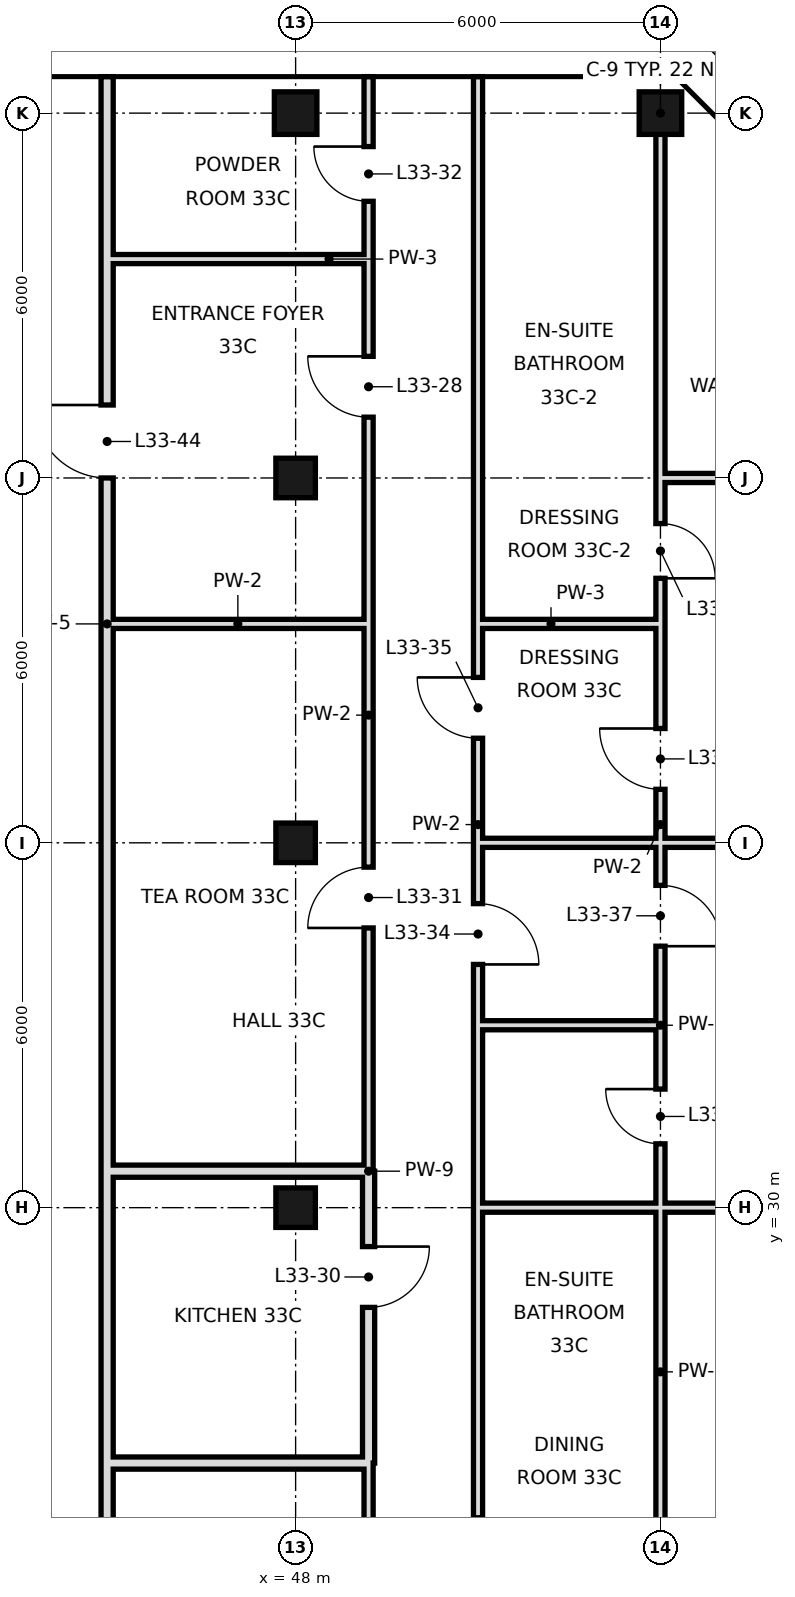
"""IFC4 building model, lengths in metres.
Left out: names, types, materials, properties, quantities, classifications, styles, units other than length and angle.
Written with IfcOpenShell. Run it as: python <this file> out.ifc"""

import sys

from ifc_helpers import new_model, si_unit, direction, frame, frame_2d, origin, origin_2d, place, context, subcontext, project, spatial, rectangle, hollow_rectangle, extrude, element, fill, save


model = new_model("IFC4")
c1 = context("Model", 3, precision=1e-05, world=origin(), true_north=direction((0.0, 1.0)))
c2 = subcontext(c1, "Body", "Model", "MODEL_VIEW")
j1 = project(units=[si_unit("LENGTHUNIT", "METRE"), si_unit("PLANEANGLEUNIT", "RADIAN")], contexts=[c1])
p1 = place(None, origin())
s1 = spatial("IfcSite", under=j1, at=p1, CompositionType="ELEMENT")
p2 = place(p1, origin())
s2 = spatial("IfcBuilding", under=s1, at=p2, CompositionType="ELEMENT")
p3 = place(p2, frame((0.0, 0.0, 147.4)))
s3 = spatial("IfcBuildingStorey", under=s2, at=p3, CompositionType="ELEMENT", Elevation=147.4)
for number, where, z_axis, x_axis in (
    (1, (48.0, 30.0, 0.0), (0.0, 0.0, 1.0), (1.0, 0.0, 0.0)),
    (2, (48.0, 36.0, 0.0), (0.0, 0.0, 1.0), (1.0, 0.0, 0.0)),
    (3, (48.0, 42.0, 0.0), (0.0, 0.0, 1.0), (1.0, 0.0, 0.0)),
):
    element("IfcColumn", number, at=place(p3, frame(where, z_axis=z_axis, x_axis=x_axis)), inside=s3, PredefinedType="COLUMN", context=c2, shape_type="SweptSolid", body=[
        extrude(hollow_rectangle(XDim=0.65, YDim=0.65, WallThickness=0.032, at=origin_2d()), origin(), (0.0, 0.0, 1.0), 3.6),
    ])
for number, where, z_axis, x_axis in (
    (4, (48.0, 48.0, 0.0), (0.0, 0.0, 1.0), (1.0, 0.0, 0.0)),
    (5, (54.0, 48.0, 0.0), (0.0, 0.0, 1.0), (1.0, 0.0, 0.0)),
):
    element("IfcColumn", number, at=place(p3, frame(where, z_axis=z_axis, x_axis=x_axis)), inside=s3, PredefinedType="COLUMN", context=c2, shape_type="SweptSolid", body=[
        extrude(hollow_rectangle(XDim=0.7, YDim=0.7, WallThickness=0.036, at=origin_2d()), origin(), (0.0, 0.0, 1.0), 3.6),
    ])
p4 = place(p3, frame((44.9, 18.7, 0.0), z_axis=(0.0, 0.0, 1.0), x_axis=(0.0, 1.0, 0.0)))
e6 = element("IfcWall", 6, at=p4, inside=s3, PredefinedType="SOLIDWALL", context=c2, shape_type="SweptSolid", body=[
    extrude(rectangle(XDim=7.1, YDim=0.2, at=frame_2d((3.55, 0.0))), origin(), (0.0, 0.0, 1.0), 3.42),
])
p5 = place(p3, frame((44.9, 30.6, 0.0), z_axis=(0.0, 0.0, 1.0), x_axis=(0.0, 1.0, 0.0)))
e7 = element("IfcWall", 7, at=p5, inside=s3, PredefinedType="SOLIDWALL", context=c2, shape_type="SweptSolid", body=[
    extrude(rectangle(XDim=18.0, YDim=0.2, at=frame_2d((9.0, 0.0))), origin(), (0.0, 0.0, 1.0), 2.72),
])
p6 = place(p5, frame((11.4, 0.0, 0.0)))
e8 = element("IfcOpeningElement", 8, at=p6, cuts=e7, PredefinedType="OPENING", context=c2, shape_type="SweptSolid", body=[
    extrude(rectangle(XDim=1.2, YDim=2.4, at=frame_2d((0.6, 1.2))), frame((0.0, 0.11, 0.0), z_axis=(0.0, -1.0, 0.0), x_axis=(1.0, 0.0, 0.0)), (0.0, 0.0, 1.0), 0.22),
])
p7 = place(p3, frame((44.9, 25.8, 0.0), z_axis=(0.0, 0.0, 1.0), x_axis=(0.0, 1.0, 0.0)))
e9 = element("IfcWall", 9, at=p7, inside=s3, PredefinedType="SOLIDWALL", context=c2, shape_type="SweptSolid", body=[
    extrude(rectangle(XDim=4.8, YDim=0.2, at=frame_2d((2.4, 0.0))), origin(), (0.0, 0.0, 1.0), 2.97),
])
p8 = place(p3, frame((49.2, 25.8, 0.0), z_axis=(0.0, 0.0, 1.0), x_axis=(0.0, 1.0, 0.0)))
e10 = element("IfcWall", 10, at=p8, inside=s3, PredefinedType="SOLIDWALL", context=c2, shape_type="SweptSolid", body=[
    extrude(rectangle(XDim=4.8, YDim=0.2, at=frame_2d((2.4, 0.0))), origin(), (0.0, 0.0, 1.0), 2.72),
])
p9 = place(p8, frame((2.56, 0.0, 0.0)))
e11 = element("IfcOpeningElement", 11, at=p9, cuts=e10, PredefinedType="OPENING", context=c2, shape_type="SweptSolid", body=[
    extrude(rectangle(XDim=1.0, YDim=2.4, at=frame_2d((0.5, 1.2))), frame((0.0, 0.11, 0.0), z_axis=(0.0, -1.0, 0.0), x_axis=(1.0, 0.0, 0.0)), (0.0, 0.0, 1.0), 0.22),
])
p10 = place(p3, frame((49.2, 18.0, 0.0), z_axis=(0.0, 0.0, 1.0), x_axis=(0.0, 1.0, 0.0)))
e12 = element("IfcWall", 12, at=p10, inside=s3, PredefinedType="PARTITIONING", context=c2, shape_type="SweptSolid", body=[
    extrude(rectangle(XDim=7.8, YDim=0.15, at=frame_2d((3.9, 0.0))), origin(), (0.0, 0.0, 1.0), 3.42),
])
p11 = place(p10, frame((2.14, 0.0, 0.0)))
e13 = element("IfcOpeningElement", 13, at=p11, cuts=e12, PredefinedType="OPENING", context=c2, shape_type="SweptSolid", body=[
    extrude(rectangle(XDim=1.0, YDim=2.4, at=frame_2d((0.5, 1.2))), frame((0.0, 0.085, 0.0), z_axis=(0.0, -1.0, 0.0), x_axis=(1.0, 0.0, 0.0)), (0.0, 0.0, 1.0), 0.17),
])
p12 = place(p3, frame((49.2, 30.6, 0.0), z_axis=(0.0, 0.0, 1.0), x_axis=(0.0, 1.0, 0.0)))
e14 = element("IfcWall", 14, at=p12, inside=s3, PredefinedType="PARTITIONING", context=c2, shape_type="SweptSolid", body=[
    extrude(rectangle(XDim=15.0, YDim=0.15, at=frame_2d((7.5, 0.0))), origin(), (0.0, 0.0, 1.0), 3.42),
])
p13 = place(p12, frame((12.4, 0.0, 0.0)))
e15 = element("IfcOpeningElement", 15, at=p13, cuts=e14, PredefinedType="OPENING", context=c2, shape_type="SweptSolid", body=[
    extrude(rectangle(XDim=1.0, YDim=2.4, at=frame_2d((0.5, 1.2))), frame((0.0, 0.085, 0.0), z_axis=(0.0, -1.0, 0.0), x_axis=(1.0, 0.0, 0.0)), (0.0, 0.0, 1.0), 0.17),
])
p14 = place(p12, frame((4.0, 0.0, 0.0)))
e16 = element("IfcOpeningElement", 16, at=p14, cuts=e14, PredefinedType="OPENING", context=c2, shape_type="SweptSolid", body=[
    extrude(rectangle(XDim=1.0, YDim=2.4, at=frame_2d((0.5, 1.2))), frame((0.0, 0.085, 0.0), z_axis=(0.0, -1.0, 0.0), x_axis=(1.0, 0.0, 0.0)), (0.0, 0.0, 1.0), 0.17),
])
p15 = place(p3, frame((49.2, 45.6, 0.0), z_axis=(0.0, 0.0, 1.0), x_axis=(0.0, 1.0, 0.0)))
e17 = element("IfcWall", 17, at=p15, inside=s3, PredefinedType="PARTITIONING", context=c2, shape_type="SweptSolid", body=[
    extrude(rectangle(XDim=3.0, YDim=0.15, at=frame_2d((1.5, 0.0))), origin(), (0.0, 0.0, 1.0), 3.42),
])
p16 = place(p15, frame((0.95, 0.0, 0.0)))
e18 = element("IfcOpeningElement", 18, at=p16, cuts=e17, PredefinedType="OPENING", context=c2, shape_type="SweptSolid", body=[
    extrude(rectangle(XDim=0.9, YDim=2.4, at=frame_2d((0.45, 1.2))), frame((0.0, 0.085, 0.0), z_axis=(0.0, -1.0, 0.0), x_axis=(1.0, 0.0, 0.0)), (0.0, 0.0, 1.0), 0.17),
])
p17 = place(p3, frame((51.0, 18.0, 0.0), z_axis=(0.0, 0.0, 1.0), x_axis=(0.0, 1.0, 0.0)))
e19 = element("IfcWall", 19, at=p17, inside=s3, PredefinedType="PARTITIONING", context=c2, shape_type="SweptSolid", body=[
    extrude(rectangle(XDim=12.0, YDim=0.15, at=frame_2d((6.0, 0.0))), origin(), (0.0, 0.0, 1.0), 3.42),
])
p18 = place(p17, frame((5.1, 0.0, 0.0)))
e20 = element("IfcOpeningElement", 20, at=p18, cuts=e19, PredefinedType="OPENING", context=c2, shape_type="SweptSolid", body=[
    extrude(rectangle(XDim=1.8, YDim=2.4, at=frame_2d((0.9, 1.2))), frame((0.0, 0.085, 0.0), z_axis=(0.0, -1.0, 0.0), x_axis=(1.0, 0.0, 0.0)), (0.0, 0.0, 1.0), 0.17),
])
p19 = place(p3, frame((51.0, 33.0, 0.0), z_axis=(0.0, 0.0, 1.0), x_axis=(0.0, 1.0, 0.0)))
e21 = element("IfcWall", 21, at=p19, inside=s3, PredefinedType="PARTITIONING", context=c2, shape_type="SweptSolid", body=[
    extrude(rectangle(XDim=6.6, YDim=0.15, at=frame_2d((3.3, 0.0))), origin(), (0.0, 0.0, 1.0), 3.42),
])
p20 = place(p19, frame((1.0, 0.0, 0.0)))
e22 = element("IfcOpeningElement", 22, at=p20, cuts=e21, PredefinedType="OPENING", context=c2, shape_type="SweptSolid", body=[
    extrude(rectangle(XDim=1.0, YDim=2.4, at=frame_2d((0.5, 1.2))), frame((0.0, 0.085, 0.0), z_axis=(0.0, -1.0, 0.0), x_axis=(1.0, 0.0, 0.0)), (0.0, 0.0, 1.0), 0.17),
])
p21 = place(p19, frame((4.72, 0.0, 0.0)))
e23 = element("IfcOpeningElement", 23, at=p21, cuts=e21, PredefinedType="OPENING", context=c2, shape_type="SweptSolid", body=[
    extrude(rectangle(XDim=1.0, YDim=2.4, at=frame_2d((0.5, 1.2))), frame((0.0, 0.085, 0.0), z_axis=(0.0, -1.0, 0.0), x_axis=(1.0, 0.0, 0.0)), (0.0, 0.0, 1.0), 0.17),
])
p22 = place(p3, frame((51.0, 30.0, 0.0), z_axis=(0.0, 0.0, 1.0), x_axis=(0.0, 1.0, 0.0)))
e24 = element("IfcWall", 24, at=p22, inside=s3, PredefinedType="PARTITIONING", context=c2, shape_type="SweptSolid", body=[
    extrude(rectangle(XDim=3.0, YDim=0.15, at=frame_2d((1.5, 0.0))), origin(), (0.0, 0.0, 1.0), 3.42),
])
p23 = place(p3, frame((51.0, 39.6, 0.0), z_axis=(0.0, 0.0, 1.0), x_axis=(0.0, 1.0, 0.0)))
e25 = element("IfcWall", 25, at=p23, inside=s3, PredefinedType="PARTITIONING", context=c2, shape_type="SweptSolid", body=[
    extrude(rectangle(XDim=9.0, YDim=0.15, at=frame_2d((4.5, 0.0))), origin(), (0.0, 0.0, 1.0), 3.42),
])
p24 = place(p3, frame((54.0, 18.0, 0.0), z_axis=(0.0, 0.0, 1.0), x_axis=(0.0, 1.0, 0.0)))
e26 = element("IfcWall", 26, at=p24, inside=s3, PredefinedType="PARTITIONING", context=c2, shape_type="SweptSolid", body=[
    extrude(rectangle(XDim=12.0, YDim=0.15, at=frame_2d((6.0, 0.0))), origin(), (0.0, 0.0, 1.0), 3.42),
])
p25 = place(p24, frame((3.16, 0.0, 0.0)))
e27 = element("IfcOpeningElement", 27, at=p25, cuts=e26, PredefinedType="OPENING", context=c2, shape_type="SweptSolid", body=[
    extrude(rectangle(XDim=1.8, YDim=2.4, at=frame_2d((0.9, 1.2))), frame((0.0, 0.085, 0.0), z_axis=(0.0, -1.0, 0.0), x_axis=(1.0, 0.0, 0.0)), (0.0, 0.0, 1.0), 0.17),
])
p26 = place(p3, frame((54.0, 33.0, 0.0), z_axis=(0.0, 0.0, 1.0), x_axis=(0.0, 1.0, 0.0)))
e28 = element("IfcWall", 28, at=p26, inside=s3, PredefinedType="PARTITIONING", context=c2, shape_type="SweptSolid", body=[
    extrude(rectangle(XDim=6.6, YDim=0.15, at=frame_2d((3.3, 0.0))), origin(), (0.0, 0.0, 1.0), 3.42),
])
p27 = place(p26, frame((1.3, 0.0, 0.0)))
e29 = element("IfcOpeningElement", 29, at=p27, cuts=e28, PredefinedType="OPENING", context=c2, shape_type="SweptSolid", body=[
    extrude(rectangle(XDim=1.0, YDim=2.4, at=frame_2d((0.5, 1.2))), frame((0.0, 0.085, 0.0), z_axis=(0.0, -1.0, 0.0), x_axis=(1.0, 0.0, 0.0)), (0.0, 0.0, 1.0), 0.17),
])
p28 = place(p26, frame((3.88, 0.0, 0.0)))
e30 = element("IfcOpeningElement", 30, at=p28, cuts=e28, PredefinedType="OPENING", context=c2, shape_type="SweptSolid", body=[
    extrude(rectangle(XDim=1.0, YDim=2.4, at=frame_2d((0.5, 1.2))), frame((0.0, 0.085, 0.0), z_axis=(0.0, -1.0, 0.0), x_axis=(1.0, 0.0, 0.0)), (0.0, 0.0, 1.0), 0.17),
])
p29 = place(p3, frame((54.0, 30.0, 0.0), z_axis=(0.0, 0.0, 1.0), x_axis=(0.0, 1.0, 0.0)))
e31 = element("IfcWall", 31, at=p29, inside=s3, PredefinedType="PARTITIONING", context=c2, shape_type="SweptSolid", body=[
    extrude(rectangle(XDim=3.0, YDim=0.15, at=frame_2d((1.5, 0.0))), origin(), (0.0, 0.0, 1.0), 3.42),
])
p30 = place(p29, frame((1.05, 0.0, 0.0)))
e32 = element("IfcOpeningElement", 32, at=p30, cuts=e31, PredefinedType="OPENING", context=c2, shape_type="SweptSolid", body=[
    extrude(rectangle(XDim=0.9, YDim=2.4, at=frame_2d((0.45, 1.2))), frame((0.0, 0.085, 0.0), z_axis=(0.0, -1.0, 0.0), x_axis=(1.0, 0.0, 0.0)), (0.0, 0.0, 1.0), 0.17),
])
p31 = place(p3, frame((54.0, 39.6, 0.0), z_axis=(0.0, 0.0, 1.0), x_axis=(0.0, 1.0, 0.0)))
e33 = element("IfcWall", 33, at=p31, inside=s3, PredefinedType="PARTITIONING", context=c2, shape_type="SweptSolid", body=[
    extrude(rectangle(XDim=8.4, YDim=0.15, at=frame_2d((4.2, 0.0))), origin(), (0.0, 0.0, 1.0), 3.42),
])
p32 = place(p31, frame((0.75, 0.0, 0.0)))
e34 = element("IfcOpeningElement", 34, at=p32, cuts=e33, PredefinedType="OPENING", context=c2, shape_type="SweptSolid", body=[
    extrude(rectangle(XDim=0.9, YDim=2.4, at=frame_2d((0.45, 1.2))), frame((0.0, 0.085, 0.0), z_axis=(0.0, -1.0, 0.0), x_axis=(1.0, 0.0, 0.0)), (0.0, 0.0, 1.0), 0.17),
])
p33 = place(p3, frame((44.9, 25.8, 0.0), z_axis=(0.0, 0.0, 1.0), x_axis=(1.0, 0.0, 0.0)))
e35 = element("IfcWall", 35, at=p33, inside=s3, PredefinedType="SOLIDWALL", context=c2, shape_type="SweptSolid", body=[
    extrude(rectangle(XDim=4.3, YDim=0.2, at=frame_2d((2.15, 0.0))), origin(), (0.0, 0.0, 1.0), 2.97),
])
p34 = place(p3, frame((54.0, 30.0, 0.0), z_axis=(0.0, 0.0, 1.0), x_axis=(1.0, 0.0, 0.0)))
e36 = element("IfcWall", 36, at=p34, inside=s3, PredefinedType="PARTITIONING", context=c2, shape_type="SweptSolid", body=[
    extrude(rectangle(XDim=6.6, YDim=0.15, at=frame_2d((3.3, 0.0))), origin(), (0.0, 0.0, 1.0), 2.72),
])
p35 = place(p3, frame((51.0, 30.0, 0.0), z_axis=(0.0, 0.0, 1.0), x_axis=(1.0, 0.0, 0.0)))
e37 = element("IfcWall", 37, at=p35, inside=s3, PredefinedType="PARTITIONING", context=c2, shape_type="SweptSolid", body=[
    extrude(rectangle(XDim=3.0, YDim=0.15, at=frame_2d((1.5, 0.0))), origin(), (0.0, 0.0, 1.0), 2.72),
])
p36 = place(p3, frame((44.9, 30.6, 0.0), z_axis=(0.0, 0.0, 1.0), x_axis=(1.0, 0.0, 0.0)))
e38 = element("IfcWall", 38, at=p36, inside=s3, PredefinedType="SOLIDWALL", context=c2, shape_type="SweptSolid", body=[
    extrude(rectangle(XDim=4.3, YDim=0.2, at=frame_2d((2.15, 0.0))), origin(), (0.0, 0.0, 1.0), 2.97),
])
p37 = place(p3, frame((51.0, 33.0, 0.0), z_axis=(0.0, 0.0, 1.0), x_axis=(1.0, 0.0, 0.0)))
e39 = element("IfcWall", 39, at=p37, inside=s3, PredefinedType="PARTITIONING", context=c2, shape_type="SweptSolid", body=[
    extrude(rectangle(XDim=3.0, YDim=0.15, at=frame_2d((1.5, 0.0))), origin(), (0.0, 0.0, 1.0), 3.42),
])
p38 = place(p3, frame((51.0, 36.0, 0.0), z_axis=(0.0, 0.0, 1.0), x_axis=(1.0, 0.0, 0.0)))
e40 = element("IfcWall", 40, at=p38, inside=s3, PredefinedType="PARTITIONING", context=c2, shape_type="SweptSolid", body=[
    extrude(rectangle(XDim=9.0, YDim=0.15, at=frame_2d((4.5, 0.0))), origin(), (0.0, 0.0, 1.0), 2.72),
])
p39 = place(p3, frame((44.9, 39.6, 0.0), z_axis=(0.0, 0.0, 1.0), x_axis=(1.0, 0.0, 0.0)))
e41 = element("IfcWall", 41, at=p39, inside=s3, PredefinedType="PARTITIONING", context=c2, shape_type="SweptSolid", body=[
    extrude(rectangle(XDim=4.3, YDim=0.15, at=frame_2d((2.15, 0.0))), origin(), (0.0, 0.0, 1.0), 3.42),
])
p40 = place(p3, frame((51.0, 39.6, 0.0), z_axis=(0.0, 0.0, 1.0), x_axis=(1.0, 0.0, 0.0)))
e42 = element("IfcWall", 42, at=p40, inside=s3, PredefinedType="PARTITIONING", context=c2, shape_type="SweptSolid", body=[
    extrude(rectangle(XDim=3.0, YDim=0.15, at=frame_2d((1.5, 0.0))), origin(), (0.0, 0.0, 1.0), 3.42),
])
p41 = place(p3, frame((54.0, 42.0, 0.0), z_axis=(0.0, 0.0, 1.0), x_axis=(1.0, 0.0, 0.0)))
e43 = element("IfcWall", 43, at=p41, inside=s3, PredefinedType="PARTITIONING", context=c2, shape_type="SweptSolid", body=[
    extrude(rectangle(XDim=6.0, YDim=0.15, at=frame_2d((3.0, 0.0))), origin(), (0.0, 0.0, 1.0), 2.72),
])
p42 = place(p41, frame((3.4, 0.0, 0.0)))
e44 = element("IfcOpeningElement", 44, at=p42, cuts=e43, PredefinedType="OPENING", context=c2, shape_type="SweptSolid", body=[
    extrude(rectangle(XDim=1.0, YDim=2.4, at=frame_2d((0.5, 1.2))), frame((0.0, 0.085, 0.0), z_axis=(0.0, -1.0, 0.0), x_axis=(1.0, 0.0, 0.0)), (0.0, 0.0, 1.0), 0.17),
])
p43 = place(p3, frame((44.9, 45.6, 0.0), z_axis=(0.0, 0.0, 1.0), x_axis=(1.0, 0.0, 0.0)))
e45 = element("IfcWall", 45, at=p43, inside=s3, PredefinedType="PARTITIONING", context=c2, shape_type="SweptSolid", body=[
    extrude(rectangle(XDim=4.3, YDim=0.15, at=frame_2d((2.15, 0.0))), origin(), (0.0, 0.0, 1.0), 3.42),
])
p44 = place(p13, frame((1.0, 0.0, 0.0), z_axis=(0.0, 0.0, 1.0), x_axis=(-1.0, 0.0, 0.0)))
e46 = element("IfcDoor", 46, at=p44, inside=s3, OperationType="SINGLE_SWING_LEFT", PredefinedType="DOOR", context=c2, shape_type="SweptSolid", body=[
    extrude(rectangle(XDim=1.0, YDim=2.4, at=frame_2d((0.5, 1.2))), frame((0.0, 0.025, 0.0), z_axis=(0.0, -1.0, 0.0), x_axis=(1.0, 0.0, 0.0)), (0.0, 0.0, 1.0), 0.05),
])
fill(e15, e46)
p45 = place(p9, origin())
e47 = element("IfcDoor", 47, at=p45, inside=s3, OperationType="SINGLE_SWING_RIGHT", PredefinedType="DOOR", context=c2, shape_type="SweptSolid", body=[
    extrude(rectangle(XDim=1.0, YDim=2.4, at=frame_2d((0.5, 1.2))), frame((0.0, 0.025, 0.0), z_axis=(0.0, -1.0, 0.0), x_axis=(1.0, 0.0, 0.0)), (0.0, 0.0, 1.0), 0.05),
])
fill(e11, e47)
p46 = place(p14, origin())
e48 = element("IfcDoor", 48, at=p46, inside=s3, OperationType="SINGLE_SWING_LEFT", PredefinedType="DOOR", context=c2, shape_type="SweptSolid", body=[
    extrude(rectangle(XDim=1.0, YDim=2.4, at=frame_2d((0.5, 1.2))), frame((0.0, 0.025, 0.0), z_axis=(0.0, -1.0, 0.0), x_axis=(1.0, 0.0, 0.0)), (0.0, 0.0, 1.0), 0.05),
])
fill(e16, e48)
p47 = place(p16, frame((0.9, 0.0, 0.0), z_axis=(0.0, 0.0, 1.0), x_axis=(-1.0, 0.0, 0.0)))
e49 = element("IfcDoor", 49, at=p47, inside=s3, OperationType="SINGLE_SWING_LEFT", PredefinedType="DOOR", context=c2, shape_type="SweptSolid", body=[
    extrude(rectangle(XDim=0.9, YDim=2.4, at=frame_2d((0.45, 1.2))), frame((0.0, 0.025, 0.0), z_axis=(0.0, -1.0, 0.0), x_axis=(1.0, 0.0, 0.0)), (0.0, 0.0, 1.0), 0.05),
])
fill(e18, e49)
p48 = place(p18, frame((1.8, 0.0, 0.0), z_axis=(0.0, 0.0, 1.0), x_axis=(-1.0, 0.0, 0.0)))
e50 = element("IfcDoor", 50, at=p48, inside=s3, OperationType="SINGLE_SWING_RIGHT", PredefinedType="DOOR", context=c2, shape_type="SweptSolid", body=[
    extrude(rectangle(XDim=1.8, YDim=2.4, at=frame_2d((0.9, 1.2))), frame((0.0, 0.025, 0.0), z_axis=(0.0, -1.0, 0.0), x_axis=(1.0, 0.0, 0.0)), (0.0, 0.0, 1.0), 0.05),
])
fill(e20, e50)
p49 = place(p20, frame((1.0, 0.0, 0.0), z_axis=(0.0, 0.0, 1.0), x_axis=(-1.0, 0.0, 0.0)))
e51 = element("IfcDoor", 51, at=p49, inside=s3, OperationType="SINGLE_SWING_RIGHT", PredefinedType="DOOR", context=c2, shape_type="SweptSolid", body=[
    extrude(rectangle(XDim=1.0, YDim=2.4, at=frame_2d((0.5, 1.2))), frame((0.0, 0.025, 0.0), z_axis=(0.0, -1.0, 0.0), x_axis=(1.0, 0.0, 0.0)), (0.0, 0.0, 1.0), 0.05),
])
fill(e22, e51)
p50 = place(p21, frame((1.0, 0.0, 0.0), z_axis=(0.0, 0.0, 1.0), x_axis=(-1.0, 0.0, 0.0)))
e52 = element("IfcDoor", 52, at=p50, inside=s3, OperationType="SINGLE_SWING_LEFT", PredefinedType="DOOR", context=c2, shape_type="SweptSolid", body=[
    extrude(rectangle(XDim=1.0, YDim=2.4, at=frame_2d((0.5, 1.2))), frame((0.0, 0.025, 0.0), z_axis=(0.0, -1.0, 0.0), x_axis=(1.0, 0.0, 0.0)), (0.0, 0.0, 1.0), 0.05),
])
fill(e23, e52)
p51 = place(p27, frame((1.0, 0.0, 0.0), z_axis=(0.0, 0.0, 1.0), x_axis=(-1.0, 0.0, 0.0)))
e53 = element("IfcDoor", 53, at=p51, inside=s3, OperationType="SINGLE_SWING_RIGHT", PredefinedType="DOOR", context=c2, shape_type="SweptSolid", body=[
    extrude(rectangle(XDim=1.0, YDim=2.4, at=frame_2d((0.5, 1.2))), frame((0.0, 0.025, 0.0), z_axis=(0.0, -1.0, 0.0), x_axis=(1.0, 0.0, 0.0)), (0.0, 0.0, 1.0), 0.05),
])
fill(e29, e53)
p52 = place(p30, frame((0.9, 0.0, 0.0), z_axis=(0.0, 0.0, 1.0), x_axis=(-1.0, 0.0, 0.0)))
e54 = element("IfcDoor", 54, at=p52, inside=s3, OperationType="SINGLE_SWING_LEFT", PredefinedType="DOOR", context=c2, shape_type="SweptSolid", body=[
    extrude(rectangle(XDim=0.9, YDim=2.4, at=frame_2d((0.45, 1.2))), frame((0.0, 0.025, 0.0), z_axis=(0.0, -1.0, 0.0), x_axis=(1.0, 0.0, 0.0)), (0.0, 0.0, 1.0), 0.05),
])
fill(e32, e54)
p53 = place(p28, frame((1.0, 0.0, 0.0), z_axis=(0.0, 0.0, 1.0), x_axis=(-1.0, 0.0, 0.0)))
e55 = element("IfcDoor", 55, at=p53, inside=s3, OperationType="SINGLE_SWING_LEFT", PredefinedType="DOOR", context=c2, shape_type="SweptSolid", body=[
    extrude(rectangle(XDim=1.0, YDim=2.4, at=frame_2d((0.5, 1.2))), frame((0.0, 0.025, 0.0), z_axis=(0.0, -1.0, 0.0), x_axis=(1.0, 0.0, 0.0)), (0.0, 0.0, 1.0), 0.05),
])
fill(e30, e55)
p54 = place(p32, frame((0.9, 0.0, 0.0), z_axis=(0.0, 0.0, 1.0), x_axis=(-1.0, 0.0, 0.0)))
e56 = element("IfcDoor", 56, at=p54, inside=s3, OperationType="SINGLE_SWING_RIGHT", PredefinedType="DOOR", context=c2, shape_type="SweptSolid", body=[
    extrude(rectangle(XDim=0.9, YDim=2.4, at=frame_2d((0.45, 1.2))), frame((0.0, 0.025, 0.0), z_axis=(0.0, -1.0, 0.0), x_axis=(1.0, 0.0, 0.0)), (0.0, 0.0, 1.0), 0.05),
])
fill(e34, e56)
p55 = place(p6, frame((1.2, 0.0, 0.0), z_axis=(0.0, 0.0, 1.0), x_axis=(-1.0, 0.0, 0.0)))
e57 = element("IfcDoor", 57, at=p55, inside=s3, OperationType="SINGLE_SWING_LEFT", PredefinedType="DOOR", context=c2, shape_type="SweptSolid", body=[
    extrude(rectangle(XDim=1.2, YDim=2.4, at=frame_2d((0.6, 1.2))), frame((0.0, 0.025, 0.0), z_axis=(0.0, -1.0, 0.0), x_axis=(1.0, 0.0, 0.0)), (0.0, 0.0, 1.0), 0.05),
])
fill(e8, e57)
save(model, sys.argv[1])
